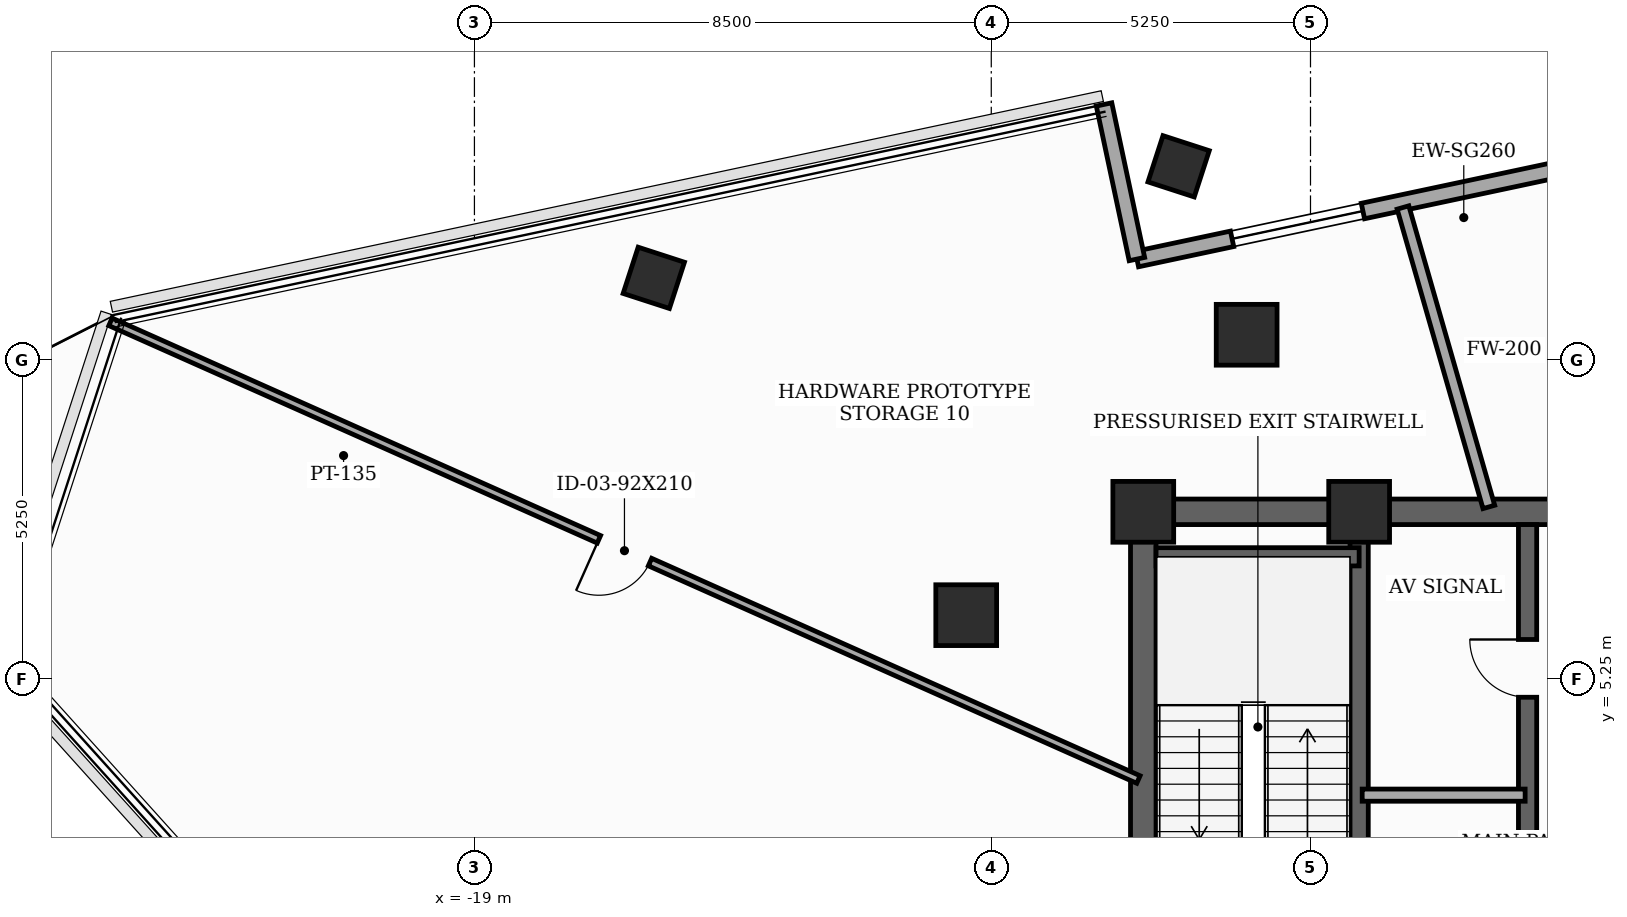
"""IFC4 building model, lengths in metres.
Left out: names, types, materials, properties, quantities, classifications, styles, units other than length and angle.
Written with IfcOpenShell. Run it as: python <this file> out.ifc"""

import sys

from ifc_helpers import new_model, si_unit, direction, frame, frame_2d, origin, origin_2d, place, context, subcontext, project, spatial, rectangle, extrude, element, fill, save


model = new_model("IFC4")
c1 = context("Model", 3, precision=1e-05, world=origin(), true_north=direction((0.0, 1.0)))
c2 = subcontext(c1, "Body", "Model", "MODEL_VIEW")
j1 = project(units=[si_unit("LENGTHUNIT", "METRE"), si_unit("PLANEANGLEUNIT", "RADIAN")], contexts=[c1])
p1 = place(None, origin())
s1 = spatial("IfcSite", under=j1, at=p1, CompositionType="ELEMENT")
p2 = place(p1, origin())
s2 = spatial("IfcBuilding", under=s1, at=p2, CompositionType="ELEMENT")
p3 = place(p2, frame((0.0, 0.0, 298.0)))
s3 = spatial("IfcBuildingStorey", under=s2, at=p3, CompositionType="ELEMENT", Elevation=298.0)
for number, where, z_axis, x_axis in (
    (1, (-4.45, 8.0, 0.0), (0.0, 0.0, 1.0), (1.0, 0.0, 0.0)),
    (2, (-8.0, 8.0, 0.0), (0.0, 0.0, 1.0), (1.0, 0.0, 0.0)),
    (3, (-6.3, 10.912, 0.0), (0.0, 0.0, 1.0), (1.0, 0.0, 0.0)),
    (4, (-10.912, 6.3, 0.0), (0.0, 0.0, 1.0), (1.0, 0.0, 0.0)),
):
    element("IfcColumn", number, at=place(p3, frame(where, z_axis=z_axis, x_axis=x_axis)), inside=s3, PredefinedType="COLUMN", context=c2, shape_type="SweptSolid", body=[
        extrude(rectangle(XDim=1.0, YDim=1.0, at=origin_2d()), origin(), (0.0, 0.0, 1.0), 3.7),
    ])
for number, where, z_axis, x_axis in (
    (5, (-7.419, 13.683, 0.0), (0.0, 0.0, 1.0), (0.309, 0.951, 0.0)),
    (6, (-16.05, 11.848, 0.0), (0.0, 0.0, 1.0), (0.309, 0.951, 0.0)),
):
    element("IfcColumn", number, at=place(p3, frame(where, z_axis=z_axis, x_axis=x_axis)), inside=s3, PredefinedType="COLUMN", context=c2, shape_type="SweptSolid", body=[
        extrude(rectangle(XDim=0.8, YDim=0.8, at=origin_2d()), origin(), (0.0, 0.0, 1.0), 3.7),
    ])
p4 = place(p3, frame((2.459, 14.402, 0.0), z_axis=(0.0, 0.0, 1.0), x_axis=(-0.978149082982, -0.207904717268, 0.0)))
e7 = element("IfcWall", 7, at=p4, inside=s3, PredefinedType="SOLIDWALL", context=c2, shape_type="SweptSolid", body=[
    extrude(rectangle(XDim=10.8, YDim=0.26, at=frame_2d((5.4, 0.0))), origin(), (0.0, 0.0, 1.0), 3.5),
])
p5 = place(p4, frame((1.6, 0.0, 0.85)))
e8 = element("IfcOpeningElement", 8, at=p5, cuts=e7, PredefinedType="OPENING", context=c2, shape_type="SweptSolid", body=[
    extrude(rectangle(XDim=2.2, YDim=1.25, at=frame_2d((1.1, 0.625))), frame((0.0, 0.14, 0.0), z_axis=(0.0, -1.0, 0.0), x_axis=(1.0, 0.0, 0.0)), (0.0, 0.0, 1.0), 0.28),
])
p6 = place(p4, frame((7.0, 0.0, 0.85)))
e9 = element("IfcOpeningElement", 9, at=p6, cuts=e7, PredefinedType="OPENING", context=c2, shape_type="SweptSolid", body=[
    extrude(rectangle(XDim=2.2, YDim=1.25, at=frame_2d((1.1, 0.625))), frame((0.0, 0.14, 0.0), z_axis=(0.0, -1.0, 0.0), x_axis=(1.0, 0.0, 0.0)), (0.0, 0.0, 1.0), 0.28),
])
p7 = place(p3, frame((-8.105, 12.157, 0.0), z_axis=(0.0, 0.0, 1.0), x_axis=(-0.207893569688, 0.978151452323, 0.0)))
e10 = element("IfcWall", 10, at=p7, inside=s3, PredefinedType="SOLIDWALL", context=c2, shape_type="SweptSolid", body=[
    extrude(rectangle(XDim=2.6, YDim=0.26, at=frame_2d((1.3, 0.0))), origin(), (0.0, 0.0, 1.0), 3.5),
])
p8 = place(p3, frame((-8.0, -8.0, 0.0), z_axis=(0.0, 0.0, 1.0), x_axis=(0.0, 1.0, 0.0)))
e11 = element("IfcWall", 11, at=p8, inside=s3, PredefinedType="SHEAR", context=c2, shape_type="SweptSolid", body=[
    extrude(rectangle(XDim=16.0, YDim=0.42, at=frame_2d((8.0, 0.0))), origin(), (0.0, 0.0, 1.0), 3.5),
])
p9 = place(p8, frame((0.681, 0.0, 0.0)))
e12 = element("IfcOpeningElement", 12, at=p9, cuts=e11, PredefinedType="OPENING", context=c2, shape_type="SweptSolid", body=[
    extrude(rectangle(XDim=0.85, YDim=2.02, at=frame_2d((0.425, 1.01))), frame((0.0, 0.22, 0.0), z_axis=(0.0, -1.0, 0.0), x_axis=(1.0, 0.0, 0.0)), (0.0, 0.0, 1.0), 0.44),
])
p10 = place(p8, frame((5.35, 0.0, 0.0)))
e13 = element("IfcOpeningElement", 13, at=p10, cuts=e11, PredefinedType="OPENING", context=c2, shape_type="SweptSolid", body=[
    extrude(rectangle(XDim=1.05, YDim=2.15, at=frame_2d((0.525, 1.075))), frame((0.0, 0.22, 0.0), z_axis=(0.0, -1.0, 0.0), x_axis=(1.0, 0.0, 0.0)), (0.0, 0.0, 1.0), 0.44),
])
p11 = place(p3, frame((-8.0, 8.0, 0.0), z_axis=(0.0, 0.0, 1.0), x_axis=(1.0, 0.0, 0.0)))
e14 = element("IfcWall", 14, at=p11, inside=s3, PredefinedType="SHEAR", context=c2, shape_type="SweptSolid", body=[
    extrude(rectangle(XDim=16.0, YDim=0.42, at=frame_2d((8.0, 0.0))), origin(), (0.0, 0.0, 1.0), 3.5),
])
p12 = place(p11, frame((7.1, 0.0, 0.0)))
e15 = element("IfcOpeningElement", 15, at=p12, cuts=e14, PredefinedType="OPENING", context=c2, shape_type="SweptSolid", body=[
    extrude(rectangle(XDim=1.8, YDim=2.15, at=frame_2d((0.9, 1.075))), frame((0.0, 0.22, 0.0), z_axis=(0.0, -1.0, 0.0), x_axis=(1.0, 0.0, 0.0)), (0.0, 0.0, 1.0), 0.44),
])
p13 = place(p3, frame((-4.45, -7.79, 0.0), z_axis=(0.0, 0.0, 1.0), x_axis=(0.0, 1.0, 0.0)))
e16 = element("IfcWall", 16, at=p13, inside=s3, PredefinedType="SHEAR", context=c2, shape_type="SweptSolid", body=[
    extrude(rectangle(XDim=15.58, YDim=0.3, at=frame_2d((7.79, 0.0))), origin(), (0.0, 0.0, 1.0), 3.5),
])
p14 = place(p3, frame((-7.79, 7.26, 0.0), z_axis=(0.0, 0.0, 1.0), x_axis=(1.0, 0.0, 0.0)))
e17 = element("IfcWall", 17, at=p14, inside=s3, PredefinedType="SHEAR", context=c2, shape_type="SweptSolid", body=[
    extrude(rectangle(XDim=3.34, YDim=0.3, at=frame_2d((1.67, 0.0))), origin(), (0.0, 0.0, 1.0), 3.5),
])
p15 = place(p3, frame((-1.68, -4.85, 0.0), z_axis=(0.0, 0.0, 1.0), x_axis=(0.0, 1.0, 0.0)))
e18 = element("IfcWall", 18, at=p15, inside=s3, PredefinedType="SHEAR", context=c2, shape_type="SweptSolid", body=[
    extrude(rectangle(XDim=12.64, YDim=0.3, at=frame_2d((6.32, 0.0))), origin(), (0.0, 0.0, 1.0), 3.5),
])
p16 = place(p15, frame((3.5, 0.0, 0.0)))
e19 = element("IfcOpeningElement", 19, at=p16, cuts=e18, PredefinedType="OPENING", context=c2, shape_type="SweptSolid", body=[
    extrude(rectangle(XDim=0.95, YDim=2.1, at=frame_2d((0.475, 1.05))), frame((0.0, 0.16, 0.0), z_axis=(0.0, -1.0, 0.0), x_axis=(1.0, 0.0, 0.0)), (0.0, 0.0, 1.0), 0.32),
])
p17 = place(p15, frame((9.8, 0.0, 0.0)))
e20 = element("IfcOpeningElement", 20, at=p17, cuts=e18, PredefinedType="OPENING", context=c2, shape_type="SweptSolid", body=[
    extrude(rectangle(XDim=0.95, YDim=2.1, at=frame_2d((0.475, 1.05))), frame((0.0, 0.16, 0.0), z_axis=(0.0, -1.0, 0.0), x_axis=(1.0, 0.0, 0.0)), (0.0, 0.0, 1.0), 0.32),
])
p18 = place(p3, frame((-4.4, 3.34, 0.0), z_axis=(0.0, 0.0, 1.0), x_axis=(1.0, 0.0, 0.0)))
e21 = element("IfcWall", 21, at=p18, inside=s3, PredefinedType="SOLIDWALL", context=c2, shape_type="SweptSolid", body=[
    extrude(rectangle(XDim=2.68, YDim=0.2, at=frame_2d((1.34, 0.0))), origin(), (0.0, 0.0, 1.0), 3.5),
])
p19 = place(p3, frame((-8.08, 3.597, 0.0), z_axis=(0.0, 0.0, 1.0), x_axis=(-0.913542590258, 0.406743083266, 0.0)))
e22 = element("IfcWall", 22, at=p19, inside=s3, PredefinedType="PARTITIONING", context=c2, shape_type="SweptSolid", body=[
    extrude(rectangle(XDim=18.505, YDim=0.135, at=frame_2d((9.252, 0.0))), origin(), (0.0, 0.0, 1.0), 2.885),
])
p20 = place(p19, frame((8.792, 0.0, 0.0)))
e23 = element("IfcOpeningElement", 23, at=p20, cuts=e22, PredefinedType="OPENING", context=c2, shape_type="SweptSolid", body=[
    extrude(rectangle(XDim=0.92, YDim=2.1, at=frame_2d((0.46, 1.05))), frame((0.0, 0.077, 0.0), z_axis=(0.0, -1.0, 0.0), x_axis=(1.0, 0.0, 0.0)), (0.0, 0.0, 1.0), 0.155),
])
p21 = place(p3, frame((-3.729, 13.005, 0.0), z_axis=(0.0, 0.0, 1.0), x_axis=(0.275658725111, -0.961255568135, 0.0)))
e24 = element("IfcWall", 24, at=p21, inside=s3, PredefinedType="SOLIDWALL", context=c2, shape_type="SweptSolid", body=[
    extrude(rectangle(XDim=5.124, YDim=0.2, at=frame_2d((2.562, 0.0))), origin(), (0.0, 0.0, 1.0), 2.885),
])
p22 = place(p6, origin())
e25 = element("IfcWindow", 25, at=p22, inside=s3, PartitioningType="SINGLE_PANEL", PredefinedType="WINDOW", context=c2, shape_type="SweptSolid", body=[
    extrude(rectangle(XDim=2.2, YDim=1.25, at=frame_2d((1.1, 0.625))), frame((0.0, 0.03, 0.0), z_axis=(0.0, -1.0, 0.0), x_axis=(1.0, 0.0, 0.0)), (0.0, 0.0, 1.0), 0.06),
])
fill(e9, e25)
p23 = place(p17, origin())
e26 = element("IfcDoor", 26, at=p23, inside=s3, OperationType="SINGLE_SWING_RIGHT", PredefinedType="DOOR", context=c2, shape_type="SweptSolid", body=[
    extrude(rectangle(XDim=0.95, YDim=2.1, at=frame_2d((0.475, 1.05))), frame((0.0, 0.025, 0.0), z_axis=(0.0, -1.0, 0.0), x_axis=(1.0, 0.0, 0.0)), (0.0, 0.0, 1.0), 0.05),
])
fill(e20, e26)
p24 = place(p20, origin())
e27 = element("IfcDoor", 27, at=p24, inside=s3, OperationType="SINGLE_SWING_RIGHT", PredefinedType="DOOR", context=c2, shape_type="SweptSolid", body=[
    extrude(rectangle(XDim=0.92, YDim=2.1, at=frame_2d((0.46, 1.05))), frame((0.0, 0.025, 0.0), z_axis=(0.0, -1.0, 0.0), x_axis=(1.0, 0.0, 0.0)), (0.0, 0.0, 1.0), 0.05),
])
fill(e23, e27)
save(model, sys.argv[1])
